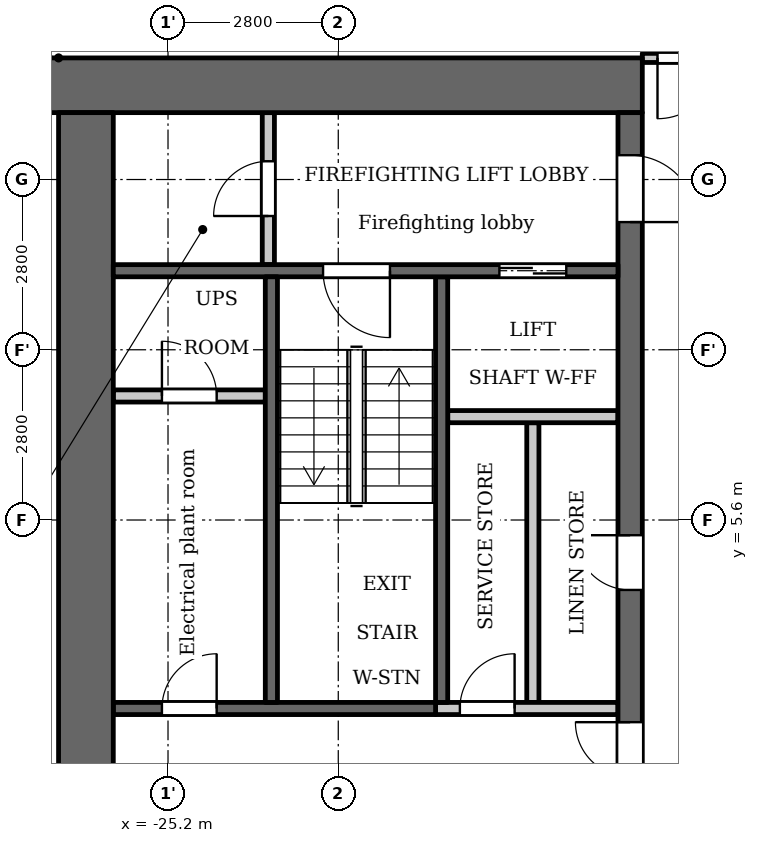
"""IFC4 building model, lengths in metres.
Left out: names, types, materials, properties, quantities, classifications, styles, units other than length and angle.
Written with IfcOpenShell. Run it as: python <this file> out.ifc"""

import sys

from ifc_helpers import new_model, si_unit, direction, frame, frame_2d, origin, place, context, subcontext, project, spatial, rectangle, extrude, element, fill, save


model = new_model("IFC4")
c1 = context("Model", 3, precision=1e-05, world=origin(), true_north=direction((0.0, 1.0)))
c2 = subcontext(c1, "Body", "Model", "MODEL_VIEW")
j1 = project(units=[si_unit("LENGTHUNIT", "METRE"), si_unit("PLANEANGLEUNIT", "RADIAN")], contexts=[c1])
p1 = place(None, origin())
s1 = spatial("IfcSite", under=j1, at=p1, CompositionType="ELEMENT")
p2 = place(p1, origin())
s2 = spatial("IfcBuilding", under=s1, at=p2, CompositionType="ELEMENT")
p3 = place(p2, frame((0.0, 0.0, 107.8)))
s3 = spatial("IfcBuildingStorey", under=s2, at=p3, CompositionType="ELEMENT", Elevation=107.8)
p4 = place(p3, frame((-20.7, 2.6, 0.0), z_axis=(0.0, 0.0, 1.0), x_axis=(0.0, 1.0, 0.0)))
e1 = element("IfcWall", 1, at=p4, inside=s3, PredefinedType="SHEAR", context=c2, shape_type="SweptSolid", body=[
    extrude(rectangle(XDim=7.0, YDim=0.2, at=frame_2d((3.5, 0.0))), origin(), (0.0, 0.0, 1.0), 3.2),
])
p5 = place(p3, frame((-20.8, 2.5, 0.0), z_axis=(0.0, 0.0, 1.0), x_axis=(-1.0, 0.0, 0.0)))
e2 = element("IfcWall", 2, at=p5, inside=s3, PredefinedType="SHEAR", context=c2, shape_type="SweptSolid", body=[
    extrude(rectangle(XDim=5.3, YDim=0.2, at=frame_2d((2.65, 0.0))), origin(), (0.0, 0.0, 1.0), 3.2),
])
p6 = place(p5, frame((3.6, 0.0, 0.0)))
e3 = element("IfcOpeningElement", 3, at=p6, cuts=e2, PredefinedType="OPENING", context=c2, shape_type="SweptSolid", body=[
    extrude(rectangle(XDim=0.9, YDim=2.1, at=frame_2d((0.45, 1.05))), frame((0.0, 0.11, 0.0), z_axis=(0.0, -1.0, 0.0), x_axis=(1.0, 0.0, 0.0)), (0.0, 0.0, 1.0), 0.22),
])
p7 = place(p3, frame((-17.4, 12.75, 0.0), z_axis=(0.0, 0.0, 1.0), x_axis=(-1.0, 0.0, 0.0)))
e4 = element("IfcWall", 4, at=p7, inside=s3, PredefinedType="SHEAR", context=c2, shape_type="SweptSolid", body=[
    extrude(rectangle(XDim=10.4, YDim=0.9, at=frame_2d((5.2, 0.0))), origin(), (0.0, 0.0, 1.0), 3.2),
])
p8 = place(p3, frame((-19.2, 2.6, 0.0), z_axis=(0.0, 0.0, 1.0), x_axis=(0.0, 1.0, 0.0)))
e5 = element("IfcWall", 5, at=p8, inside=s3, PredefinedType="PARTITIONING", context=c2, shape_type="SweptSolid", body=[
    extrude(rectangle(XDim=4.6, YDim=0.2, at=frame_2d((2.3, 0.0))), origin(), (0.0, 0.0, 1.0), 3.2),
])
p9 = place(p3, frame((-17.6, -12.3, 0.0), z_axis=(0.0, 0.0, 1.0), x_axis=(0.0, 1.0, 0.0)))
e6 = element("IfcWall", 6, at=p9, inside=s3, PredefinedType="SHEAR", context=c2, shape_type="SweptSolid", body=[
    extrude(rectangle(XDim=24.6, YDim=0.4, at=frame_2d((12.3, 0.0))), origin(), (0.0, 0.0, 1.0), 3.2),
])
p10 = place(p9, frame((6.0, 0.0, 0.0)))
e7 = element("IfcOpeningElement", 7, at=p10, cuts=e6, PredefinedType="OPENING", context=c2, shape_type="SweptSolid", body=[
    extrude(rectangle(XDim=1.1, YDim=2.1, at=frame_2d((0.55, 1.05))), frame((0.0, 0.21, 0.0), z_axis=(0.0, -1.0, 0.0), x_axis=(1.0, 0.0, 0.0)), (0.0, 0.0, 1.0), 0.42),
])
p11 = place(p9, frame((8.4, 0.0, 0.0)))
e8 = element("IfcOpeningElement", 8, at=p11, cuts=e6, PredefinedType="OPENING", context=c2, shape_type="SweptSolid", body=[
    extrude(rectangle(XDim=1.1, YDim=2.1, at=frame_2d((0.55, 1.05))), frame((0.0, 0.21, 0.0), z_axis=(0.0, -1.0, 0.0), x_axis=(1.0, 0.0, 0.0)), (0.0, 0.0, 1.0), 0.42),
])
p12 = place(p9, frame((10.8, 0.0, 0.0)))
e9 = element("IfcOpeningElement", 9, at=p12, cuts=e6, PredefinedType="OPENING", context=c2, shape_type="SweptSolid", body=[
    extrude(rectangle(XDim=1.1, YDim=2.1, at=frame_2d((0.55, 1.05))), frame((0.0, 0.21, 0.0), z_axis=(0.0, -1.0, 0.0), x_axis=(1.0, 0.0, 0.0)), (0.0, 0.0, 1.0), 0.42),
])
p13 = place(p9, frame((16.75, 0.0, 0.0)))
e10 = element("IfcOpeningElement", 10, at=p13, cuts=e6, PredefinedType="OPENING", context=c2, shape_type="SweptSolid", body=[
    extrude(rectangle(XDim=0.9, YDim=2.1, at=frame_2d((0.45, 1.05))), frame((0.0, 0.21, 0.0), z_axis=(0.0, -1.0, 0.0), x_axis=(1.0, 0.0, 0.0)), (0.0, 0.0, 1.0), 0.42),
])
p14 = place(p9, frame((22.8, 0.0, 0.0)))
e11 = element("IfcOpeningElement", 11, at=p14, cuts=e6, PredefinedType="OPENING", context=c2, shape_type="SweptSolid", body=[
    extrude(rectangle(XDim=1.1, YDim=2.1, at=frame_2d((0.55, 1.05))), frame((0.0, 0.21, 0.0), z_axis=(0.0, -1.0, 0.0), x_axis=(1.0, 0.0, 0.0)), (0.0, 0.0, 1.0), 0.42),
])
p15 = place(p9, frame((0.7, 0.0, 0.0)))
e12 = element("IfcOpeningElement", 12, at=p15, cuts=e6, PredefinedType="OPENING", context=c2, shape_type="SweptSolid", body=[
    extrude(rectangle(XDim=1.1, YDim=2.1, at=frame_2d((0.55, 1.05))), frame((0.0, 0.21, 0.0), z_axis=(0.0, -1.0, 0.0), x_axis=(1.0, 0.0, 0.0)), (0.0, 0.0, 1.0), 0.42),
])
p16 = place(p9, frame((12.775, 0.0, 0.0)))
e13 = element("IfcOpeningElement", 13, at=p16, cuts=e6, PredefinedType="OPENING", context=c2, shape_type="SweptSolid", body=[
    extrude(rectangle(XDim=1.8, YDim=2.1, at=frame_2d((0.9, 1.05))), frame((0.0, 0.21, 0.0), z_axis=(0.0, -1.0, 0.0), x_axis=(1.0, 0.0, 0.0)), (0.0, 0.0, 1.0), 0.42),
])
p17 = place(p3, frame((-26.55, -12.3, 0.0), z_axis=(0.0, 0.0, 1.0), x_axis=(0.0, 1.0, 0.0)))
e14 = element("IfcWall", 14, at=p17, inside=s3, PredefinedType="SHEAR", context=c2, shape_type="SweptSolid", body=[
    extrude(rectangle(XDim=24.6, YDim=0.9, at=frame_2d((12.3, 0.0))), origin(), (0.0, 0.0, 1.0), 3.2),
])
p18 = place(p3, frame((-23.55, 9.8, 0.0), z_axis=(0.0, 0.0, 1.0), x_axis=(0.0, 1.0, 0.0)))
e15 = element("IfcWall", 15, at=p18, inside=s3, PredefinedType="PARTITIONING", context=c2, shape_type="SweptSolid", body=[
    extrude(rectangle(XDim=2.5, YDim=0.2, at=frame_2d((1.25, 0.0))), origin(), (0.0, 0.0, 1.0), 3.2),
])
p19 = place(p18, frame((0.8, 0.0, 0.0)))
e16 = element("IfcOpeningElement", 16, at=p19, cuts=e15, PredefinedType="OPENING", context=c2, shape_type="SweptSolid", body=[
    extrude(rectangle(XDim=0.9, YDim=2.1, at=frame_2d((0.45, 1.05))), frame((0.0, 0.11, 0.0), z_axis=(0.0, -1.0, 0.0), x_axis=(1.0, 0.0, 0.0)), (0.0, 0.0, 1.0), 0.22),
])
p20 = place(p3, frame((-23.6, 7.64, 0.0), z_axis=(0.0, 0.0, 1.0), x_axis=(-1.0, 0.0, 0.0)))
e17 = element("IfcWall", 17, at=p20, inside=s3, PredefinedType="PARTITIONING", context=c2, shape_type="SweptSolid", body=[
    extrude(rectangle(XDim=2.5, YDim=0.2, at=frame_2d((1.25, 0.0))), origin(), (0.0, 0.0, 1.0), 3.2),
])
p21 = place(p20, frame((0.8, 0.0, 0.0)))
e18 = element("IfcOpeningElement", 18, at=p21, cuts=e17, PredefinedType="OPENING", context=c2, shape_type="SweptSolid", body=[
    extrude(rectangle(XDim=0.9, YDim=2.1, at=frame_2d((0.45, 1.05))), frame((0.0, 0.11, 0.0), z_axis=(0.0, -1.0, 0.0), x_axis=(1.0, 0.0, 0.0)), (0.0, 0.0, 1.0), 0.22),
])
p22 = place(p3, frame((-17.8, 2.5, 0.0), z_axis=(0.0, 0.0, 1.0), x_axis=(-1.0, 0.0, 0.0)))
e19 = element("IfcWall", 19, at=p22, inside=s3, PredefinedType="PARTITIONING", context=c2, shape_type="SweptSolid", body=[
    extrude(rectangle(XDim=3.0, YDim=0.2, at=frame_2d((1.5, 0.0))), origin(), (0.0, 0.0, 1.0), 3.2),
])
p23 = place(p22, frame((1.7, 0.0, 0.0)))
e20 = element("IfcOpeningElement", 20, at=p23, cuts=e19, PredefinedType="OPENING", context=c2, shape_type="SweptSolid", body=[
    extrude(rectangle(XDim=0.9, YDim=2.1, at=frame_2d((0.45, 1.05))), frame((0.0, 0.11, 0.0), z_axis=(0.0, -1.0, 0.0), x_axis=(1.0, 0.0, 0.0)), (0.0, 0.0, 1.0), 0.22),
])
p24 = place(p3, frame((-17.8, 7.3, 0.0), z_axis=(0.0, 0.0, 1.0), x_axis=(-1.0, 0.0, 0.0)))
e21 = element("IfcWall", 21, at=p24, inside=s3, PredefinedType="PARTITIONING", context=c2, shape_type="SweptSolid", body=[
    extrude(rectangle(XDim=2.8, YDim=0.2, at=frame_2d((1.4, 0.0))), origin(), (0.0, 0.0, 1.0), 3.2),
])
p25 = place(p3, frame((-17.8, 9.7, 0.0), z_axis=(0.0, 0.0, 1.0), x_axis=(-1.0, 0.0, 0.0)))
e22 = element("IfcWall", 22, at=p25, inside=s3, PredefinedType="SHEAR", context=c2, shape_type="SweptSolid", body=[
    extrude(rectangle(XDim=8.3, YDim=0.2, at=frame_2d((4.15, 0.0))), origin(), (0.0, 0.0, 1.0), 3.2),
])
p26 = place(p25, frame((0.85, 0.0, 0.0)))
e23 = element("IfcOpeningElement", 23, at=p26, cuts=e22, PredefinedType="OPENING", context=c2, shape_type="SweptSolid", body=[
    extrude(rectangle(XDim=1.1, YDim=2.1, at=frame_2d((0.55, 1.05))), frame((0.0, 0.11, 0.0), z_axis=(0.0, -1.0, 0.0), x_axis=(1.0, 0.0, 0.0)), (0.0, 0.0, 1.0), 0.22),
])
p27 = place(p25, frame((3.75, 0.0, 0.0)))
e24 = element("IfcOpeningElement", 24, at=p27, cuts=e22, PredefinedType="OPENING", context=c2, shape_type="SweptSolid", body=[
    extrude(rectangle(XDim=1.1, YDim=2.1, at=frame_2d((0.55, 1.05))), frame((0.0, 0.11, 0.0), z_axis=(0.0, -1.0, 0.0), x_axis=(1.0, 0.0, 0.0)), (0.0, 0.0, 1.0), 0.22),
])
p28 = place(p3, frame((-23.5, 2.6, 0.0), z_axis=(0.0, 0.0, 1.0), x_axis=(0.0, 1.0, 0.0)))
e25 = element("IfcWall", 25, at=p28, inside=s3, PredefinedType="SHEAR", context=c2, shape_type="SweptSolid", body=[
    extrude(rectangle(XDim=7.0, YDim=0.2, at=frame_2d((3.5, 0.0))), origin(), (0.0, 0.0, 1.0), 3.2),
])
p29 = place(p3, frame((-17.4, 13.2, 0.0), z_axis=(0.0, 0.0, 1.0), x_axis=(1.0, 0.0, 0.0)))
e26 = element("IfcWall", 26, at=p29, inside=s3, PredefinedType="PARTITIONING", context=c2, shape_type="SweptSolid", body=[
    extrude(rectangle(XDim=34.8, YDim=0.15, at=frame_2d((17.4, 0.0))), origin(), (0.0, 0.0, 1.0), 3.2),
])
p30 = place(p29, frame((0.25, 0.0, 0.0)))
e27 = element("IfcOpeningElement", 27, at=p30, cuts=e26, PredefinedType="OPENING", context=c2, shape_type="SweptSolid", body=[
    extrude(rectangle(XDim=1.0, YDim=2.1, at=frame_2d((0.5, 1.05))), frame((0.0, 0.085, 0.0), z_axis=(0.0, -1.0, 0.0), x_axis=(1.0, 0.0, 0.0)), (0.0, 0.0, 1.0), 0.17),
])
p31 = place(p29, frame((33.65, 0.0, 0.0)))
e28 = element("IfcOpeningElement", 28, at=p31, cuts=e26, PredefinedType="OPENING", context=c2, shape_type="SweptSolid", body=[
    extrude(rectangle(XDim=1.0, YDim=2.1, at=frame_2d((0.5, 1.05))), frame((0.0, 0.085, 0.0), z_axis=(0.0, -1.0, 0.0), x_axis=(1.0, 0.0, 0.0)), (0.0, 0.0, 1.0), 0.17),
])
p32 = place(p29, frame((4.55, 0.0, 0.0)))
e29 = element("IfcOpeningElement", 29, at=p32, cuts=e26, PredefinedType="OPENING", context=c2, shape_type="SweptSolid", body=[
    extrude(rectangle(XDim=1.0, YDim=2.1, at=frame_2d((0.5, 1.05))), frame((0.0, 0.085, 0.0), z_axis=(0.0, -1.0, 0.0), x_axis=(1.0, 0.0, 0.0)), (0.0, 0.0, 1.0), 0.17),
])
p33 = place(p29, frame((6.85, 0.0, 0.0)))
e30 = element("IfcOpeningElement", 30, at=p33, cuts=e26, PredefinedType="OPENING", context=c2, shape_type="SweptSolid", body=[
    extrude(rectangle(XDim=1.0, YDim=2.1, at=frame_2d((0.5, 1.05))), frame((0.0, 0.085, 0.0), z_axis=(0.0, -1.0, 0.0), x_axis=(1.0, 0.0, 0.0)), (0.0, 0.0, 1.0), 0.17),
])
p34 = place(p29, frame((12.5, 0.0, 0.0)))
e31 = element("IfcOpeningElement", 31, at=p34, cuts=e26, PredefinedType="OPENING", context=c2, shape_type="SweptSolid", body=[
    extrude(rectangle(XDim=1.0, YDim=2.1, at=frame_2d((0.5, 1.05))), frame((0.0, 0.085, 0.0), z_axis=(0.0, -1.0, 0.0), x_axis=(1.0, 0.0, 0.0)), (0.0, 0.0, 1.0), 0.17),
])
p35 = place(p29, frame((25.7, 0.0, 0.0)))
e32 = element("IfcOpeningElement", 32, at=p35, cuts=e26, PredefinedType="OPENING", context=c2, shape_type="SweptSolid", body=[
    extrude(rectangle(XDim=1.0, YDim=2.1, at=frame_2d((0.5, 1.05))), frame((0.0, 0.085, 0.0), z_axis=(0.0, -1.0, 0.0), x_axis=(1.0, 0.0, 0.0)), (0.0, 0.0, 1.0), 0.17),
])
p36 = place(p29, frame((29.75, 0.0, 0.0)))
e33 = element("IfcOpeningElement", 33, at=p36, cuts=e26, PredefinedType="OPENING", context=c2, shape_type="SweptSolid", body=[
    extrude(rectangle(XDim=1.0, YDim=2.1, at=frame_2d((0.5, 1.05))), frame((0.0, 0.085, 0.0), z_axis=(0.0, -1.0, 0.0), x_axis=(1.0, 0.0, 0.0)), (0.0, 0.0, 1.0), 0.17),
])
p37 = place(p13, origin())
e34 = element("IfcDoor", 34, at=p37, inside=s3, OperationType="SINGLE_SWING_LEFT", PredefinedType="DOOR", context=c2, shape_type="SweptSolid", body=[
    extrude(rectangle(XDim=0.9, YDim=2.1, at=frame_2d((0.45, 1.05))), frame((0.0, 0.025, 0.0), z_axis=(0.0, -1.0, 0.0), x_axis=(1.0, 0.0, 0.0)), (0.0, 0.0, 1.0), 0.05),
])
fill(e10, e34)
p38 = place(p23, origin())
e35 = element("IfcDoor", 35, at=p38, inside=s3, OperationType="SINGLE_SWING_LEFT", PredefinedType="DOOR", context=c2, shape_type="SweptSolid", body=[
    extrude(rectangle(XDim=0.9, YDim=2.1, at=frame_2d((0.45, 1.05))), frame((0.0, 0.025, 0.0), z_axis=(0.0, -1.0, 0.0), x_axis=(1.0, 0.0, 0.0)), (0.0, 0.0, 1.0), 0.05),
])
fill(e20, e35)
p39 = place(p26, origin())
e36 = element("IfcDoor", 36, at=p39, inside=s3, OperationType="DOUBLE_DOOR_SLIDING", PredefinedType="DOOR", context=c2, shape_type="SweptSolid", body=[
    extrude(rectangle(XDim=1.1, YDim=2.1, at=frame_2d((0.55, 1.05))), frame((0.0, 0.025, 0.0), z_axis=(0.0, -1.0, 0.0), x_axis=(1.0, 0.0, 0.0)), (0.0, 0.0, 1.0), 0.05),
])
fill(e23, e36)
p40 = place(p14, origin())
e37 = element("IfcDoor", 37, at=p40, inside=s3, OperationType="SINGLE_SWING_LEFT", PredefinedType="DOOR", context=c2, shape_type="SweptSolid", body=[
    extrude(rectangle(XDim=1.1, YDim=2.1, at=frame_2d((0.55, 1.05))), frame((0.0, 0.025, 0.0), z_axis=(0.0, -1.0, 0.0), x_axis=(1.0, 0.0, 0.0)), (0.0, 0.0, 1.0), 0.05),
])
fill(e11, e37)
p41 = place(p19, origin())
e38 = element("IfcDoor", 38, at=p41, inside=s3, OperationType="SINGLE_SWING_RIGHT", PredefinedType="DOOR", context=c2, shape_type="SweptSolid", body=[
    extrude(rectangle(XDim=0.9, YDim=2.1, at=frame_2d((0.45, 1.05))), frame((0.0, 0.025, 0.0), z_axis=(0.0, -1.0, 0.0), x_axis=(1.0, 0.0, 0.0)), (0.0, 0.0, 1.0), 0.05),
])
fill(e16, e38)
p42 = place(p27, origin())
e39 = element("IfcDoor", 39, at=p42, inside=s3, OperationType="SINGLE_SWING_RIGHT", PredefinedType="DOOR", context=c2, shape_type="SweptSolid", body=[
    extrude(rectangle(XDim=1.1, YDim=2.1, at=frame_2d((0.55, 1.05))), frame((0.0, 0.025, 0.0), z_axis=(0.0, -1.0, 0.0), x_axis=(1.0, 0.0, 0.0)), (0.0, 0.0, 1.0), 0.05),
])
fill(e24, e39)
p43 = place(p16, origin())
e40 = element("IfcDoor", 40, at=p43, inside=s3, OperationType="DOUBLE_DOOR_SINGLE_SWING", PredefinedType="DOOR", context=c2, shape_type="SweptSolid", body=[
    extrude(rectangle(XDim=1.8, YDim=2.1, at=frame_2d((0.9, 1.05))), frame((0.0, 0.025, 0.0), z_axis=(0.0, -1.0, 0.0), x_axis=(1.0, 0.0, 0.0)), (0.0, 0.0, 1.0), 0.05),
])
fill(e13, e40)
p44 = place(p21, origin())
e41 = element("IfcDoor", 41, at=p44, inside=s3, OperationType="SINGLE_SWING_RIGHT", PredefinedType="DOOR", context=c2, shape_type="SweptSolid", body=[
    extrude(rectangle(XDim=0.9, YDim=2.1, at=frame_2d((0.45, 1.05))), frame((0.0, 0.025, 0.0), z_axis=(0.0, -1.0, 0.0), x_axis=(1.0, 0.0, 0.0)), (0.0, 0.0, 1.0), 0.05),
])
fill(e18, e41)
p45 = place(p6, origin())
e42 = element("IfcDoor", 42, at=p45, inside=s3, OperationType="SINGLE_SWING_LEFT", PredefinedType="DOOR", context=c2, shape_type="SweptSolid", body=[
    extrude(rectangle(XDim=0.9, YDim=2.1, at=frame_2d((0.45, 1.05))), frame((0.0, 0.025, 0.0), z_axis=(0.0, -1.0, 0.0), x_axis=(1.0, 0.0, 0.0)), (0.0, 0.0, 1.0), 0.05),
])
fill(e3, e42)
p46 = place(p30, origin())
e43 = element("IfcDoor", 43, at=p46, inside=s3, OperationType="SINGLE_SWING_LEFT", PredefinedType="DOOR", context=c2, shape_type="SweptSolid", body=[
    extrude(rectangle(XDim=1.0, YDim=2.1, at=frame_2d((0.5, 1.05))), frame((0.0, 0.025, 0.0), z_axis=(0.0, -1.0, 0.0), x_axis=(1.0, 0.0, 0.0)), (0.0, 0.0, 1.0), 0.05),
])
fill(e27, e43)
save(model, sys.argv[1])
